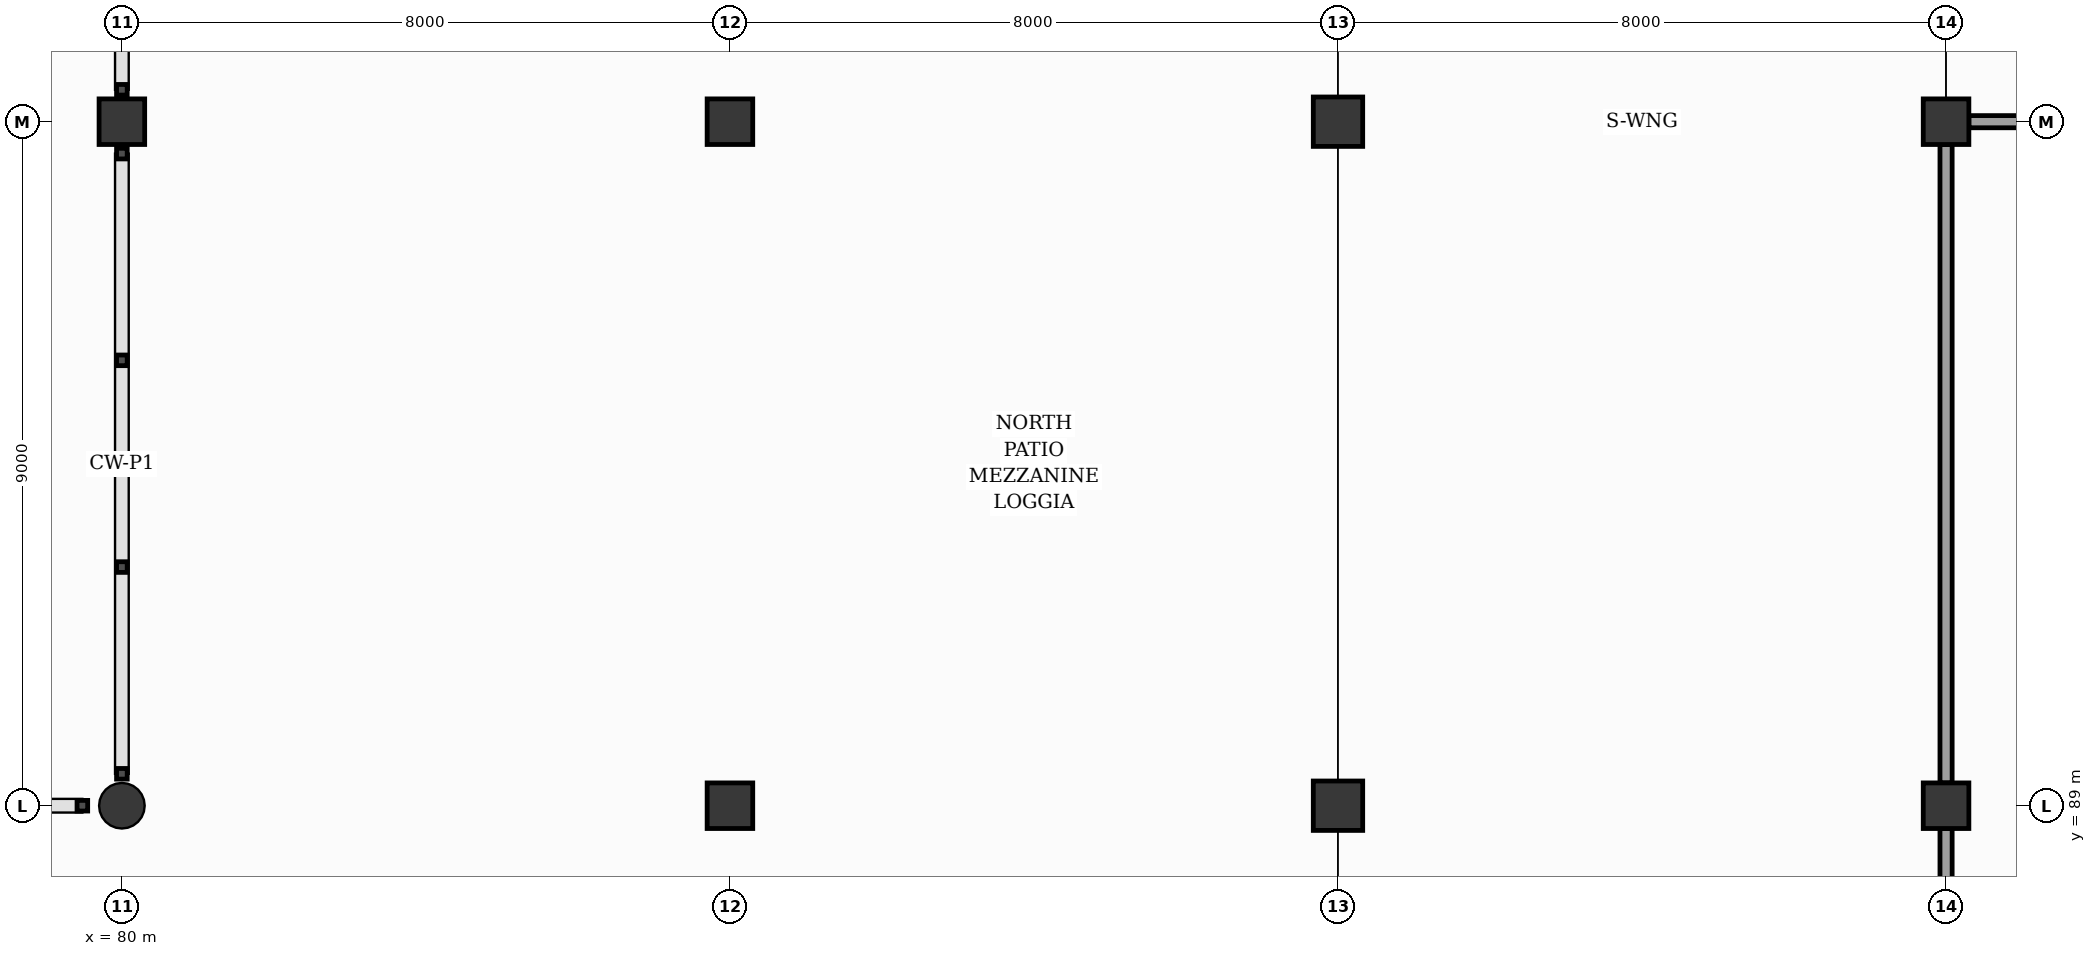
"""IFC4 building model, lengths in metres.
Left out: names, types, materials, properties, quantities, classifications, styles, units other than length and angle.
Written with IfcOpenShell. Run it as: python <this file> out.ifc"""

import sys

from ifc_helpers import new_model, si_unit, direction, frame, frame_2d, origin, origin_2d, place, context, subcontext, project, spatial, rectangle, circle, extrude, element, save


model = new_model("IFC4")
c1 = context("Model", 3, precision=1e-05, world=origin(), true_north=direction((0.0, 1.0)))
c2 = subcontext(c1, "Body", "Model", "MODEL_VIEW")
j1 = project(units=[si_unit("LENGTHUNIT", "METRE"), si_unit("PLANEANGLEUNIT", "RADIAN")], contexts=[c1])
p1 = place(None, origin())
s1 = spatial("IfcSite", under=j1, at=p1, CompositionType="ELEMENT")
p2 = place(p1, origin())
s2 = spatial("IfcBuilding", under=s1, at=p2, CompositionType="ELEMENT")
p3 = place(p2, frame((0.0, 0.0, 4.8)))
s3 = spatial("IfcBuildingStorey", under=s2, at=p3, CompositionType="ELEMENT", Elevation=4.8)
p4 = place(p3, frame((80.0, 89.0, 0.0), z_axis=(0.0, 0.0, 1.0), x_axis=(1.0, 0.0, 0.0)))
e1 = element("IfcColumn", 1, at=p4, inside=s3, PredefinedType="COLUMN", context=c2, shape_type="SweptSolid", body=[
    extrude(circle(Radius=0.3, at=origin_2d()), origin(), (0.0, 0.0, 1.0), 4.8),
])
for number, where, z_axis, x_axis in (
    (2, (80.0, 98.0, 0.0), (0.0, 0.0, 1.0), (1.0, 0.0, 0.0)),
    (3, (88.0, 89.0, 0.0), (0.0, 0.0, 1.0), (1.0, 0.0, 0.0)),
    (4, (88.0, 98.0, 0.0), (0.0, 0.0, 1.0), (1.0, 0.0, 0.0)),
):
    element("IfcColumn", number, at=place(p3, frame(where, z_axis=z_axis, x_axis=x_axis)), inside=s3, PredefinedType="COLUMN", context=c2, shape_type="SweptSolid", body=[
        extrude(rectangle(XDim=0.6, YDim=0.6, at=origin_2d()), origin(), (0.0, 0.0, 1.0), 4.8),
    ])
for number, where, z_axis, x_axis in (
    (5, (96.0, 89.0, 0.0), (0.0, 0.0, 1.0), (1.0, 0.0, 0.0)),
    (6, (96.0, 98.0, 0.0), (0.0, 0.0, 1.0), (1.0, 0.0, 0.0)),
):
    element("IfcColumn", number, at=place(p3, frame(where, z_axis=z_axis, x_axis=x_axis)), inside=s3, PredefinedType="COLUMN", context=c2, shape_type="SweptSolid", body=[
        extrude(rectangle(XDim=0.65, YDim=0.65, at=origin_2d()), origin(), (0.0, 0.0, 1.0), 4.8),
    ])
for number, where, z_axis, x_axis in (
    (7, (104.0, 89.0, 0.0), (0.0, 0.0, 1.0), (1.0, 0.0, 0.0)),
    (8, (104.0, 98.0, 0.0), (0.0, 0.0, 1.0), (1.0, 0.0, 0.0)),
):
    element("IfcColumn", number, at=place(p3, frame(where, z_axis=z_axis, x_axis=x_axis)), inside=s3, PredefinedType="COLUMN", context=c2, shape_type="SweptSolid", body=[
        extrude(rectangle(XDim=0.6, YDim=0.6, at=origin_2d()), origin(), (0.0, 0.0, 1.0), 4.8),
    ])
p5 = place(p3, frame((104.3, 98.0, 0.0), z_axis=(0.0, 0.0, 1.0), x_axis=(1.0, 0.0, 0.0)))
e9 = element("IfcWall", 9, at=p5, inside=s3, PredefinedType="PARTITIONING", context=c2, shape_type="SweptSolid", body=[
    extrude(rectangle(XDim=7.4, YDim=0.16, at=frame_2d((3.7, 0.0))), origin(), (0.0, 0.0, 1.0), 3.7),
])
p6 = place(p5, frame((3.2, 0.0, 0.0)))
e10 = element("IfcOpeningElement", 10, at=p6, cuts=e9, PredefinedType="OPENING", context=c2, shape_type="SweptSolid", body=[
    extrude(rectangle(XDim=1.0, YDim=2.1, at=frame_2d((0.5, 1.05))), frame((0.0, 0.09, 0.0), z_axis=(0.0, -1.0, 0.0), x_axis=(1.0, 0.0, 0.0)), (0.0, 0.0, 1.0), 0.18),
])
p7 = place(p3, frame((104.0, 80.3, 0.0), z_axis=(0.0, 0.0, 1.0), x_axis=(0.0, 1.0, 0.0)))
e11 = element("IfcWall", 11, at=p7, inside=s3, PredefinedType="PARTITIONING", context=c2, shape_type="SweptSolid", body=[
    extrude(rectangle(XDim=8.4, YDim=0.16, at=frame_2d((4.2, 0.0))), origin(), (0.0, 0.0, 1.0), 2.71),
])
p8 = place(p3, frame((104.0, 89.3, 0.0), z_axis=(0.0, 0.0, 1.0), x_axis=(0.0, 1.0, 0.0)))
e12 = element("IfcWall", 12, at=p8, inside=s3, PredefinedType="PARTITIONING", context=c2, shape_type="SweptSolid", body=[
    extrude(rectangle(XDim=8.4, YDim=0.16, at=frame_2d((4.2, 0.0))), origin(), (0.0, 0.0, 1.0), 3.7),
])
save(model, sys.argv[1])
